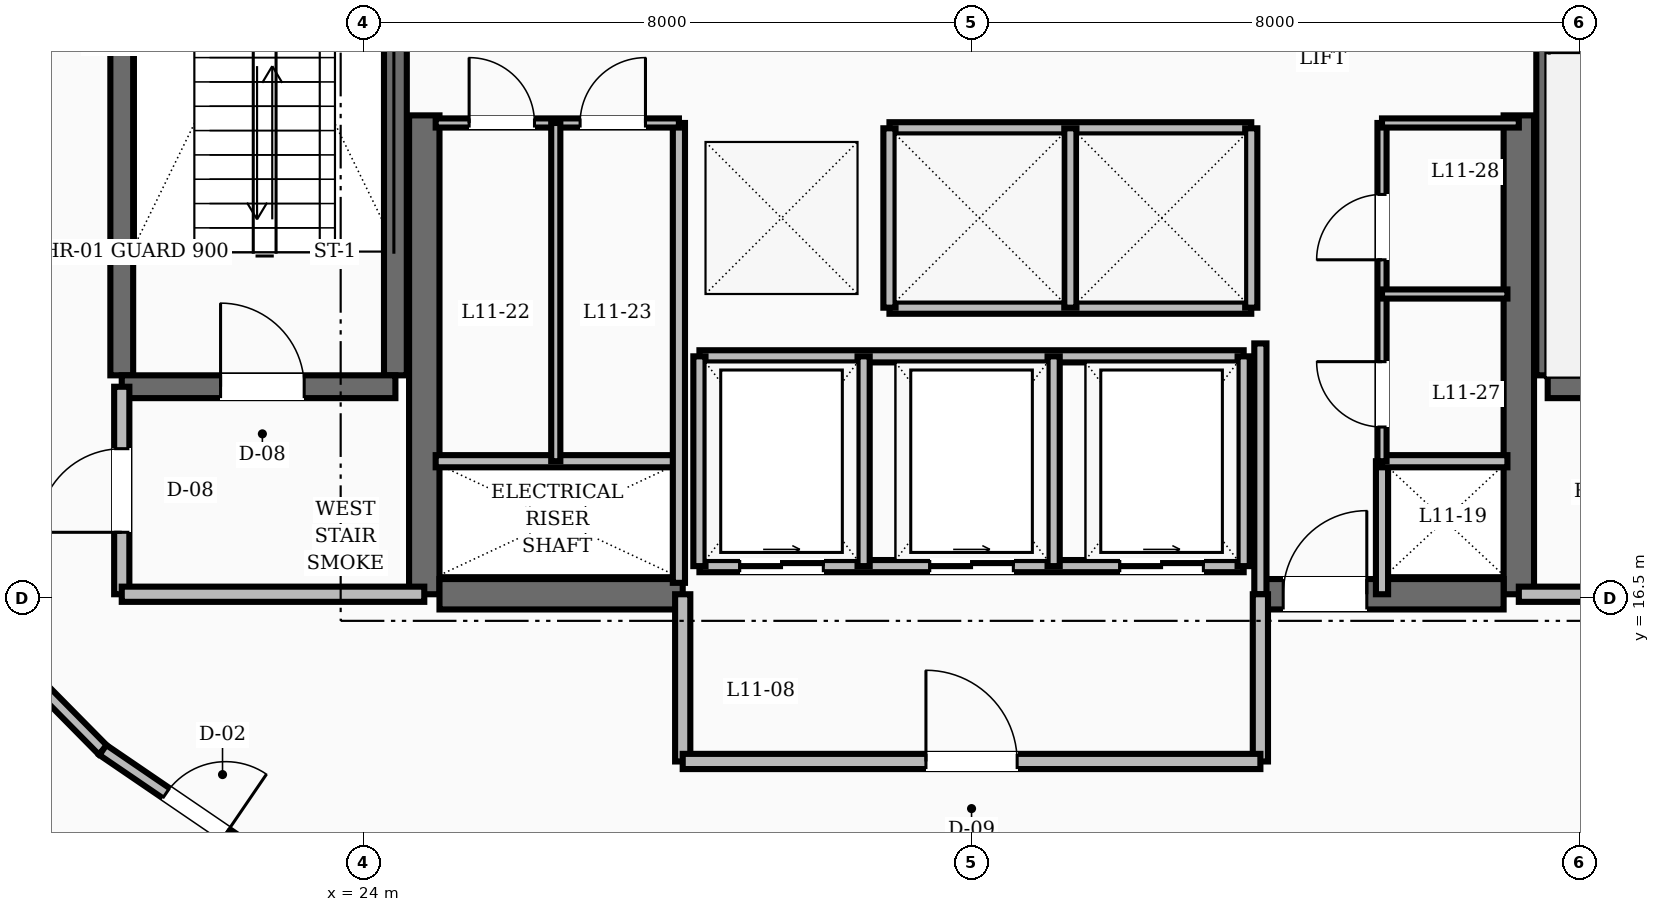
"""IFC4 building model, lengths in metres.
Left out: names, types, materials, properties, quantities, classifications, styles, units other than length and angle.
Written with IfcOpenShell. Run it as: python <this file> out.ifc"""

import sys

from ifc_helpers import new_model, si_unit, direction, frame, frame_2d, origin, place, context, subcontext, project, spatial, rectangle, extrude, element, fill, save


model = new_model("IFC4")
c1 = context("Model", 3, precision=1e-05, world=origin(), true_north=direction((0.0, 1.0)))
c2 = subcontext(c1, "Body", "Model", "MODEL_VIEW")
j1 = project(units=[si_unit("LENGTHUNIT", "METRE"), si_unit("PLANEANGLEUNIT", "RADIAN")], contexts=[c1])
p1 = place(None, origin())
s1 = spatial("IfcSite", under=j1, at=p1, CompositionType="ELEMENT")
p2 = place(p1, origin())
s2 = spatial("IfcBuilding", under=s1, at=p2, CompositionType="ELEMENT")
p3 = place(p2, frame((0.0, 0.0, 48.4)))
s3 = spatial("IfcBuildingStorey", under=s2, at=p3, CompositionType="ELEMENT", Elevation=48.4)
for number, where, z_axis, x_axis in (
    (1, (24.8, 16.55, 0.0), (0.0, 0.0, 1.0), (0.0, 1.0, 0.0)),
    (2, (39.2, 16.55, 0.0), (0.0, 0.0, 1.0), (0.0, 1.0, 0.0)),
):
    element("IfcWall", number, at=place(p3, frame(where, z_axis=z_axis, x_axis=x_axis)), inside=s3, PredefinedType="SHEAR", context=c2, shape_type="SweptSolid", body=[
        extrude(rectangle(XDim=6.3, YDim=0.4, at=frame_2d((3.15, 0.0))), origin(), (0.0, 0.0, 1.0), 3.6),
    ])
p4 = place(p3, frame((25.0, 16.55, 0.0), z_axis=(0.0, 0.0, 1.0), x_axis=(1.0, 0.0, 0.0)))
e3 = element("IfcWall", 3, at=p4, inside=s3, PredefinedType="SHEAR", context=c2, shape_type="SweptSolid", body=[
    extrude(rectangle(XDim=3.2, YDim=0.4, at=frame_2d((1.6, 0.0))), origin(), (0.0, 0.0, 1.0), 3.6),
])
p5 = place(p3, frame((35.8, 16.55, 0.0), z_axis=(0.0, 0.0, 1.0), x_axis=(1.0, 0.0, 0.0)))
e4 = element("IfcWall", 4, at=p5, inside=s3, PredefinedType="SHEAR", context=c2, shape_type="SweptSolid", body=[
    extrude(rectangle(XDim=3.2, YDim=0.4, at=frame_2d((1.6, 0.0))), origin(), (0.0, 0.0, 1.0), 3.6),
])
p6 = place(p5, frame((0.3, 0.0, 0.0)))
e5 = element("IfcOpeningElement", 5, at=p6, cuts=e4, PredefinedType="OPENING", context=c2, shape_type="SweptSolid", body=[
    extrude(rectangle(XDim=1.1, YDim=2.1, at=frame_2d((0.55, 1.05))), frame((0.0, 0.21, 0.0), z_axis=(0.0, -1.0, 0.0), x_axis=(1.0, 0.0, 0.0)), (0.0, 0.0, 1.0), 0.42),
])
for number, where, z_axis, x_axis in (
    (6, (20.82, 19.43, 0.0), (0.0, 0.0, 1.0), (0.0, 1.0, 0.0)),
    (7, (24.42, 19.43, 0.0), (0.0, 0.0, 1.0), (0.0, 1.0, 0.0)),
):
    element("IfcWall", number, at=place(p3, frame(where, z_axis=z_axis, x_axis=x_axis)), inside=s3, PredefinedType="SHEAR", context=c2, shape_type="SweptSolid", body=[
        extrude(rectangle(XDim=8.74, YDim=0.3, at=frame_2d((4.37, 0.0))), origin(), (0.0, 0.0, 1.0), 3.6),
    ])
p7 = place(p3, frame((20.82, 19.28, 0.0), z_axis=(0.0, 0.0, 1.0), x_axis=(1.0, 0.0, 0.0)))
e8 = element("IfcWall", 8, at=p7, inside=s3, PredefinedType="SHEAR", context=c2, shape_type="SweptSolid", body=[
    extrude(rectangle(XDim=3.6, YDim=0.3, at=frame_2d((1.8, 0.0))), origin(), (0.0, 0.0, 1.0), 3.6),
])
p8 = place(p7, frame((1.3, 0.0, 0.0)))
e9 = element("IfcOpeningElement", 9, at=p8, cuts=e8, PredefinedType="OPENING", context=c2, shape_type="SweptSolid", body=[
    extrude(rectangle(XDim=1.1, YDim=2.1, at=frame_2d((0.55, 1.05))), frame((0.0, 0.16, 0.0), z_axis=(0.0, -1.0, 0.0), x_axis=(1.0, 0.0, 0.0)), (0.0, 0.0, 1.0), 0.32),
])
p9 = place(p3, frame((39.58, 19.43, 0.0), z_axis=(0.0, 0.0, 1.0), x_axis=(0.0, 1.0, 0.0)))
e10 = element("IfcWall", 10, at=p9, inside=s3, PredefinedType="SHEAR", context=c2, shape_type="SweptSolid", body=[
    extrude(rectangle(XDim=8.74, YDim=0.3, at=frame_2d((4.37, 0.0))), origin(), (0.0, 0.0, 1.0), 3.6),
])
p10 = place(p3, frame((39.58, 19.28, 0.0), z_axis=(0.0, 0.0, 1.0), x_axis=(1.0, 0.0, 0.0)))
e11 = element("IfcWall", 11, at=p10, inside=s3, PredefinedType="SHEAR", context=c2, shape_type="SweptSolid", body=[
    extrude(rectangle(XDim=3.6, YDim=0.3, at=frame_2d((1.8, 0.0))), origin(), (0.0, 0.0, 1.0), 3.6),
])
p11 = place(p3, frame((20.82, 16.55, 0.0), z_axis=(0.0, 0.0, 1.0), x_axis=(0.0, 1.0, 0.0)))
e12 = element("IfcWall", 12, at=p11, inside=s3, PredefinedType="SOLIDWALL", context=c2, shape_type="SweptSolid", body=[
    extrude(rectangle(XDim=2.73, YDim=0.2, at=frame_2d((1.365, 0.0))), origin(), (0.0, 0.0, 1.0), 2.61),
])
p12 = place(p11, frame((0.815, 0.0, 0.0)))
e13 = element("IfcOpeningElement", 13, at=p12, cuts=e12, PredefinedType="OPENING", context=c2, shape_type="SweptSolid", body=[
    extrude(rectangle(XDim=1.1, YDim=2.1, at=frame_2d((0.55, 1.05))), frame((0.0, 0.11, 0.0), z_axis=(0.0, -1.0, 0.0), x_axis=(1.0, 0.0, 0.0)), (0.0, 0.0, 1.0), 0.22),
])
for number, where, z_axis, x_axis in (
    (14, (20.82, 16.55, 0.0), (0.0, 0.0, 1.0), (1.0, 0.0, 0.0)),
    (15, (39.2, 16.55, 0.0), (0.0, 0.0, 1.0), (1.0, 0.0, 0.0)),
):
    element("IfcWall", number, at=place(p3, frame(where, z_axis=z_axis, x_axis=x_axis)), inside=s3, PredefinedType="SOLIDWALL", context=c2, shape_type="SweptSolid", body=[
        extrude(rectangle(XDim=3.98, YDim=0.2, at=frame_2d((1.99, 0.0))), origin(), (0.0, 0.0, 1.0), 2.61),
    ])
p13 = place(p3, frame((35.8, 16.55, 0.0), z_axis=(0.0, 0.0, 1.0), x_axis=(0.0, 1.0, 0.0)))
e16 = element("IfcWall", 16, at=p13, inside=s3, PredefinedType="SOLIDWALL", context=c2, shape_type="SweptSolid", body=[
    extrude(rectangle(XDim=3.3, YDim=0.16, at=frame_2d((1.65, 0.0))), origin(), (0.0, 0.0, 1.0), 2.61),
])
p14 = place(p3, frame((37.4, 16.55, 0.0), z_axis=(0.0, 0.0, 1.0), x_axis=(0.0, 1.0, 0.0)))
e17 = element("IfcWall", 17, at=p14, inside=s3, PredefinedType="SOLIDWALL", context=c2, shape_type="SweptSolid", body=[
    extrude(rectangle(XDim=1.75, YDim=0.16, at=frame_2d((0.875, 0.0))), origin(), (0.0, 0.0, 1.0), 2.61),
])
for number, where, z_axis, x_axis in (
    (18, (28.2, 14.35, 0.0), (0.0, 0.0, 1.0), (0.0, 1.0, 0.0)),
    (19, (35.8, 14.35, 0.0), (0.0, 0.0, 1.0), (0.0, 1.0, 0.0)),
):
    element("IfcWall", number, at=place(p3, frame(where, z_axis=z_axis, x_axis=x_axis)), inside=s3, PredefinedType="SOLIDWALL", context=c2, shape_type="SweptSolid", body=[
        extrude(rectangle(XDim=2.2, YDim=0.2, at=frame_2d((1.1, 0.0))), origin(), (0.0, 0.0, 1.0), 2.61),
    ])
p15 = place(p3, frame((28.2, 14.35, 0.0), z_axis=(0.0, 0.0, 1.0), x_axis=(1.0, 0.0, 0.0)))
e20 = element("IfcWall", 20, at=p15, inside=s3, PredefinedType="SOLIDWALL", context=c2, shape_type="SweptSolid", body=[
    extrude(rectangle(XDim=7.6, YDim=0.2, at=frame_2d((3.8, 0.0))), origin(), (0.0, 0.0, 1.0), 2.61),
])
p16 = place(p15, frame((3.2, 0.0, 0.0)))
e21 = element("IfcOpeningElement", 21, at=p16, cuts=e20, PredefinedType="OPENING", context=c2, shape_type="SweptSolid", body=[
    extrude(rectangle(XDim=1.2, YDim=2.1, at=frame_2d((0.6, 1.05))), frame((0.0, 0.11, 0.0), z_axis=(0.0, -1.0, 0.0), x_axis=(1.0, 0.0, 0.0)), (0.0, 0.0, 1.0), 0.22),
])
for number, where, z_axis, x_axis in (
    (22, (30.92, 22.68, 0.0), (0.0, 0.0, 1.0), (1.0, 0.0, 0.0)),
    (23, (30.92, 20.32, 0.0), (0.0, 0.0, 1.0), (1.0, 0.0, 0.0)),
):
    element("IfcWall", number, at=place(p3, frame(where, z_axis=z_axis, x_axis=x_axis)), inside=s3, PredefinedType="SOLIDWALL", context=c2, shape_type="SweptSolid", body=[
        extrude(rectangle(XDim=4.76, YDim=0.16, at=frame_2d((2.38, 0.0))), origin(), (0.0, 0.0, 1.0), 2.61),
    ])
for number, where, z_axis, x_axis in (
    (24, (30.92, 20.32, 0.0), (0.0, 0.0, 1.0), (0.0, 1.0, 0.0)),
    (25, (33.3, 20.32, 0.0), (0.0, 0.0, 1.0), (0.0, 1.0, 0.0)),
    (26, (35.68, 20.32, 0.0), (0.0, 0.0, 1.0), (0.0, 1.0, 0.0)),
):
    element("IfcWall", number, at=place(p3, frame(where, z_axis=z_axis, x_axis=x_axis)), inside=s3, PredefinedType="SOLIDWALL", context=c2, shape_type="SweptSolid", body=[
        extrude(rectangle(XDim=2.36, YDim=0.16, at=frame_2d((1.18, 0.0))), origin(), (0.0, 0.0, 1.0), 2.61),
    ])
p17 = place(p3, frame((28.42, 16.92, 0.0), z_axis=(0.0, 0.0, 1.0), x_axis=(1.0, 0.0, 0.0)))
e27 = element("IfcWall", 27, at=p17, inside=s3, PredefinedType="SOLIDWALL", context=c2, shape_type="SweptSolid", body=[
    extrude(rectangle(XDim=7.16, YDim=0.16, at=frame_2d((3.58, 0.0))), origin(), (0.0, 0.0, 1.0), 2.61),
])
p18 = place(p17, frame((0.53, 0.0, 0.0)))
e28 = element("IfcOpeningElement", 28, at=p18, cuts=e27, PredefinedType="OPENING", context=c2, shape_type="SweptSolid", body=[
    extrude(rectangle(XDim=1.1, YDim=2.15, at=frame_2d((0.55, 1.075))), frame((0.0, 0.09, 0.0), z_axis=(0.0, -1.0, 0.0), x_axis=(1.0, 0.0, 0.0)), (0.0, 0.0, 1.0), 0.18),
])
p19 = place(p17, frame((3.03, 0.0, 0.0)))
e29 = element("IfcOpeningElement", 29, at=p19, cuts=e27, PredefinedType="OPENING", context=c2, shape_type="SweptSolid", body=[
    extrude(rectangle(XDim=1.1, YDim=2.15, at=frame_2d((0.55, 1.075))), frame((0.0, 0.09, 0.0), z_axis=(0.0, -1.0, 0.0), x_axis=(1.0, 0.0, 0.0)), (0.0, 0.0, 1.0), 0.18),
])
p20 = place(p17, frame((5.53, 0.0, 0.0)))
e30 = element("IfcOpeningElement", 30, at=p20, cuts=e27, PredefinedType="OPENING", context=c2, shape_type="SweptSolid", body=[
    extrude(rectangle(XDim=1.1, YDim=2.15, at=frame_2d((0.55, 1.075))), frame((0.0, 0.09, 0.0), z_axis=(0.0, -1.0, 0.0), x_axis=(1.0, 0.0, 0.0)), (0.0, 0.0, 1.0), 0.18),
])
p21 = place(p3, frame((28.42, 19.68, 0.0), z_axis=(0.0, 0.0, 1.0), x_axis=(1.0, 0.0, 0.0)))
e31 = element("IfcWall", 31, at=p21, inside=s3, PredefinedType="SOLIDWALL", context=c2, shape_type="SweptSolid", body=[
    extrude(rectangle(XDim=7.16, YDim=0.16, at=frame_2d((3.58, 0.0))), origin(), (0.0, 0.0, 1.0), 2.61),
])
for number, where, z_axis, x_axis in (
    (32, (28.42, 16.92, 0.0), (0.0, 0.0, 1.0), (0.0, 1.0, 0.0)),
    (33, (30.58, 16.92, 0.0), (0.0, 0.0, 1.0), (0.0, 1.0, 0.0)),
    (34, (33.08, 16.92, 0.0), (0.0, 0.0, 1.0), (0.0, 1.0, 0.0)),
    (35, (35.58, 16.92, 0.0), (0.0, 0.0, 1.0), (0.0, 1.0, 0.0)),
):
    element("IfcWall", number, at=place(p3, frame(where, z_axis=z_axis, x_axis=x_axis)), inside=s3, PredefinedType="SOLIDWALL", context=c2, shape_type="SweptSolid", body=[
        extrude(rectangle(XDim=2.76, YDim=0.16, at=frame_2d((1.38, 0.0))), origin(), (0.0, 0.0, 1.0), 2.61),
    ])
p22 = place(p3, frame((24.95, 18.3, 0.0), z_axis=(0.0, 0.0, 1.0), x_axis=(1.0, 0.0, 0.0)))
e36 = element("IfcWall", 36, at=p22, inside=s3, PredefinedType="SOLIDWALL", context=c2, shape_type="SweptSolid", body=[
    extrude(rectangle(XDim=3.2, YDim=0.16, at=frame_2d((1.6, 0.0))), origin(), (0.0, 0.0, 1.0), 2.61),
])
p23 = place(p3, frame((28.15, 16.7, 0.0), z_axis=(0.0, 0.0, 1.0), x_axis=(0.0, 1.0, 0.0)))
e37 = element("IfcWall", 37, at=p23, inside=s3, PredefinedType="SOLIDWALL", context=c2, shape_type="SweptSolid", body=[
    extrude(rectangle(XDim=6.05, YDim=0.16, at=frame_2d((3.025, 0.0))), origin(), (0.0, 0.0, 1.0), 2.61),
])
p24 = place(p3, frame((37.4, 18.3, 0.0), z_axis=(0.0, 0.0, 1.0), x_axis=(1.0, 0.0, 0.0)))
e38 = element("IfcWall", 38, at=p24, inside=s3, PredefinedType="SOLIDWALL", context=c2, shape_type="SweptSolid", body=[
    extrude(rectangle(XDim=1.65, YDim=0.16, at=frame_2d((0.825, 0.0))), origin(), (0.0, 0.0, 1.0), 2.61),
])
p25 = place(p3, frame((24.95, 22.75, 0.0), z_axis=(0.0, 0.0, 1.0), x_axis=(1.0, 0.0, 0.0)))
e39 = element("IfcWall", 39, at=p25, inside=s3, PredefinedType="PARTITIONING", context=c2, shape_type="SweptSolid", body=[
    extrude(rectangle(XDim=3.2, YDim=0.12, at=frame_2d((1.6, 0.0))), origin(), (0.0, 0.0, 1.0), 2.61),
])
p26 = place(p25, frame((0.44, 0.0, 0.0)))
e40 = element("IfcOpeningElement", 40, at=p26, cuts=e39, PredefinedType="OPENING", context=c2, shape_type="SweptSolid", body=[
    extrude(rectangle(XDim=0.86, YDim=2.1, at=frame_2d((0.43, 1.05))), frame((0.0, 0.07, 0.0), z_axis=(0.0, -1.0, 0.0), x_axis=(1.0, 0.0, 0.0)), (0.0, 0.0, 1.0), 0.14),
])
p27 = place(p25, frame((1.9, 0.0, 0.0)))
e41 = element("IfcOpeningElement", 41, at=p27, cuts=e39, PredefinedType="OPENING", context=c2, shape_type="SweptSolid", body=[
    extrude(rectangle(XDim=0.86, YDim=2.1, at=frame_2d((0.43, 1.05))), frame((0.0, 0.07, 0.0), z_axis=(0.0, -1.0, 0.0), x_axis=(1.0, 0.0, 0.0)), (0.0, 0.0, 1.0), 0.14),
])
p28 = place(p3, frame((37.4, 18.3, 0.0), z_axis=(0.0, 0.0, 1.0), x_axis=(0.0, 1.0, 0.0)))
e42 = element("IfcWall", 42, at=p28, inside=s3, PredefinedType="PARTITIONING", context=c2, shape_type="SweptSolid", body=[
    extrude(rectangle(XDim=4.45, YDim=0.12, at=frame_2d((2.225, 0.0))), origin(), (0.0, 0.0, 1.0), 2.61),
])
p29 = place(p28, frame((0.45, 0.0, 0.0)))
e43 = element("IfcOpeningElement", 43, at=p29, cuts=e42, PredefinedType="OPENING", context=c2, shape_type="SweptSolid", body=[
    extrude(rectangle(XDim=0.86, YDim=2.1, at=frame_2d((0.43, 1.05))), frame((0.0, 0.07, 0.0), z_axis=(0.0, -1.0, 0.0), x_axis=(1.0, 0.0, 0.0)), (0.0, 0.0, 1.0), 0.14),
])
p30 = place(p28, frame((2.65, 0.0, 0.0)))
e44 = element("IfcOpeningElement", 44, at=p30, cuts=e42, PredefinedType="OPENING", context=c2, shape_type="SweptSolid", body=[
    extrude(rectangle(XDim=0.86, YDim=2.1, at=frame_2d((0.43, 1.05))), frame((0.0, 0.07, 0.0), z_axis=(0.0, -1.0, 0.0), x_axis=(1.0, 0.0, 0.0)), (0.0, 0.0, 1.0), 0.14),
])
p31 = place(p3, frame((37.4, 22.75, 0.0), z_axis=(0.0, 0.0, 1.0), x_axis=(1.0, 0.0, 0.0)))
e45 = element("IfcWall", 45, at=p31, inside=s3, PredefinedType="PARTITIONING", context=c2, shape_type="SweptSolid", body=[
    extrude(rectangle(XDim=1.8, YDim=0.12, at=frame_2d((0.9, 0.0))), origin(), (0.0, 0.0, 1.0), 2.61),
])
p32 = place(p3, frame((26.53, 18.3, 0.0), z_axis=(0.0, 0.0, 1.0), x_axis=(0.0, 1.0, 0.0)))
e46 = element("IfcWall", 46, at=p32, inside=s3, PredefinedType="PARTITIONING", context=c2, shape_type="SweptSolid", body=[
    extrude(rectangle(XDim=4.45, YDim=0.12, at=frame_2d((2.225, 0.0))), origin(), (0.0, 0.0, 1.0), 2.61),
])
p33 = place(p3, frame((37.4, 20.5, 0.0), z_axis=(0.0, 0.0, 1.0), x_axis=(1.0, 0.0, 0.0)))
e47 = element("IfcWall", 47, at=p33, inside=s3, PredefinedType="PARTITIONING", context=c2, shape_type="SweptSolid", body=[
    extrude(rectangle(XDim=1.65, YDim=0.12, at=frame_2d((0.825, 0.0))), origin(), (0.0, 0.0, 1.0), 2.61),
])
p34 = place(p3, frame((18.562, 16.537, 0.0), z_axis=(0.0, 0.0, 1.0), x_axis=(0.702569520063, -0.711615113301, 0.0)))
e48 = element("IfcWall", 48, at=p34, inside=s3, PredefinedType="SOLIDWALL", context=c2, shape_type="SweptSolid", body=[
    extrude(rectangle(XDim=2.861, YDim=0.16, at=frame_2d((1.43, 0.0))), origin(), (0.0, 0.0, 1.0), 2.61),
])
p35 = place(p3, frame((20.572, 14.501, 0.0), z_axis=(0.0, 0.0, 1.0), x_axis=(0.826112340767, -0.563505457323, 0.0)))
e49 = element("IfcWall", 49, at=p35, inside=s3, PredefinedType="SOLIDWALL", context=c2, shape_type="SweptSolid", body=[
    extrude(rectangle(XDim=2.965, YDim=0.16, at=frame_2d((1.482, 0.0))), origin(), (0.0, 0.0, 1.0), 2.61),
])
p36 = place(p35, frame((1.007, 0.0, 0.0)))
e50 = element("IfcOpeningElement", 50, at=p36, cuts=e49, PredefinedType="OPENING", context=c2, shape_type="SweptSolid", body=[
    extrude(rectangle(XDim=0.95, YDim=2.1, at=frame_2d((0.475, 1.05))), frame((0.0, 0.09, 0.0), z_axis=(0.0, -1.0, 0.0), x_axis=(1.0, 0.0, 0.0)), (0.0, 0.0, 1.0), 0.18),
])
p37 = place(p8, origin())
e51 = element("IfcDoor", 51, at=p37, inside=s3, OperationType="SINGLE_SWING_LEFT", PredefinedType="DOOR", context=c2, shape_type="SweptSolid", body=[
    extrude(rectangle(XDim=1.1, YDim=2.1, at=frame_2d((0.55, 1.05))), frame((0.0, 0.025, 0.0), z_axis=(0.0, -1.0, 0.0), x_axis=(1.0, 0.0, 0.0)), (0.0, 0.0, 1.0), 0.05),
])
fill(e9, e51)
p38 = place(p12, origin())
e52 = element("IfcDoor", 52, at=p38, inside=s3, OperationType="SINGLE_SWING_LEFT", PredefinedType="DOOR", context=c2, shape_type="SweptSolid", body=[
    extrude(rectangle(XDim=1.1, YDim=2.1, at=frame_2d((0.55, 1.05))), frame((0.0, 0.025, 0.0), z_axis=(0.0, -1.0, 0.0), x_axis=(1.0, 0.0, 0.0)), (0.0, 0.0, 1.0), 0.05),
])
fill(e13, e52)
p39 = place(p6, origin())
e53 = element("IfcDoor", 53, at=p39, inside=s3, OperationType="SINGLE_SWING_RIGHT", PredefinedType="DOOR", context=c2, shape_type="SweptSolid", body=[
    extrude(rectangle(XDim=1.1, YDim=2.1, at=frame_2d((0.55, 1.05))), frame((0.0, 0.025, 0.0), z_axis=(0.0, -1.0, 0.0), x_axis=(1.0, 0.0, 0.0)), (0.0, 0.0, 1.0), 0.05),
])
fill(e5, e53)
p40 = place(p16, origin())
e54 = element("IfcDoor", 54, at=p40, inside=s3, OperationType="SINGLE_SWING_LEFT", PredefinedType="DOOR", context=c2, shape_type="SweptSolid", body=[
    extrude(rectangle(XDim=1.2, YDim=2.1, at=frame_2d((0.6, 1.05))), frame((0.0, 0.025, 0.0), z_axis=(0.0, -1.0, 0.0), x_axis=(1.0, 0.0, 0.0)), (0.0, 0.0, 1.0), 0.05),
])
fill(e21, e54)
p41 = place(p18, origin())
e55 = element("IfcDoor", 55, at=p41, inside=s3, OperationType="SLIDING_TO_RIGHT", PredefinedType="DOOR", context=c2, shape_type="SweptSolid", body=[
    extrude(rectangle(XDim=1.1, YDim=2.15, at=frame_2d((0.55, 1.075))), frame((0.0, 0.025, 0.0), z_axis=(0.0, -1.0, 0.0), x_axis=(1.0, 0.0, 0.0)), (0.0, 0.0, 1.0), 0.05),
])
fill(e28, e55)
p42 = place(p19, origin())
e56 = element("IfcDoor", 56, at=p42, inside=s3, OperationType="SLIDING_TO_RIGHT", PredefinedType="DOOR", context=c2, shape_type="SweptSolid", body=[
    extrude(rectangle(XDim=1.1, YDim=2.15, at=frame_2d((0.55, 1.075))), frame((0.0, 0.025, 0.0), z_axis=(0.0, -1.0, 0.0), x_axis=(1.0, 0.0, 0.0)), (0.0, 0.0, 1.0), 0.05),
])
fill(e29, e56)
p43 = place(p20, origin())
e57 = element("IfcDoor", 57, at=p43, inside=s3, OperationType="SLIDING_TO_RIGHT", PredefinedType="DOOR", context=c2, shape_type="SweptSolid", body=[
    extrude(rectangle(XDim=1.1, YDim=2.15, at=frame_2d((0.55, 1.075))), frame((0.0, 0.025, 0.0), z_axis=(0.0, -1.0, 0.0), x_axis=(1.0, 0.0, 0.0)), (0.0, 0.0, 1.0), 0.05),
])
fill(e30, e57)
p44 = place(p26, origin())
e58 = element("IfcDoor", 58, at=p44, inside=s3, OperationType="SINGLE_SWING_LEFT", PredefinedType="DOOR", context=c2, shape_type="SweptSolid", body=[
    extrude(rectangle(XDim=0.86, YDim=2.1, at=frame_2d((0.43, 1.05))), frame((0.0, 0.025, 0.0), z_axis=(0.0, -1.0, 0.0), x_axis=(1.0, 0.0, 0.0)), (0.0, 0.0, 1.0), 0.05),
])
fill(e40, e58)
p45 = place(p27, origin())
e59 = element("IfcDoor", 59, at=p45, inside=s3, OperationType="SINGLE_SWING_RIGHT", PredefinedType="DOOR", context=c2, shape_type="SweptSolid", body=[
    extrude(rectangle(XDim=0.86, YDim=2.1, at=frame_2d((0.43, 1.05))), frame((0.0, 0.025, 0.0), z_axis=(0.0, -1.0, 0.0), x_axis=(1.0, 0.0, 0.0)), (0.0, 0.0, 1.0), 0.05),
])
fill(e41, e59)
p46 = place(p29, origin())
e60 = element("IfcDoor", 60, at=p46, inside=s3, OperationType="SINGLE_SWING_RIGHT", PredefinedType="DOOR", context=c2, shape_type="SweptSolid", body=[
    extrude(rectangle(XDim=0.86, YDim=2.1, at=frame_2d((0.43, 1.05))), frame((0.0, 0.025, 0.0), z_axis=(0.0, -1.0, 0.0), x_axis=(1.0, 0.0, 0.0)), (0.0, 0.0, 1.0), 0.05),
])
fill(e43, e60)
p47 = place(p30, origin())
e61 = element("IfcDoor", 61, at=p47, inside=s3, OperationType="SINGLE_SWING_LEFT", PredefinedType="DOOR", context=c2, shape_type="SweptSolid", body=[
    extrude(rectangle(XDim=0.86, YDim=2.1, at=frame_2d((0.43, 1.05))), frame((0.0, 0.025, 0.0), z_axis=(0.0, -1.0, 0.0), x_axis=(1.0, 0.0, 0.0)), (0.0, 0.0, 1.0), 0.05),
])
fill(e44, e61)
p48 = place(p36, origin())
e62 = element("IfcDoor", 62, at=p48, inside=s3, OperationType="SINGLE_SWING_RIGHT", PredefinedType="DOOR", context=c2, shape_type="SweptSolid", body=[
    extrude(rectangle(XDim=0.95, YDim=2.1, at=frame_2d((0.475, 1.05))), frame((0.0, 0.025, 0.0), z_axis=(0.0, -1.0, 0.0), x_axis=(1.0, 0.0, 0.0)), (0.0, 0.0, 1.0), 0.05),
])
fill(e50, e62)
save(model, sys.argv[1])
